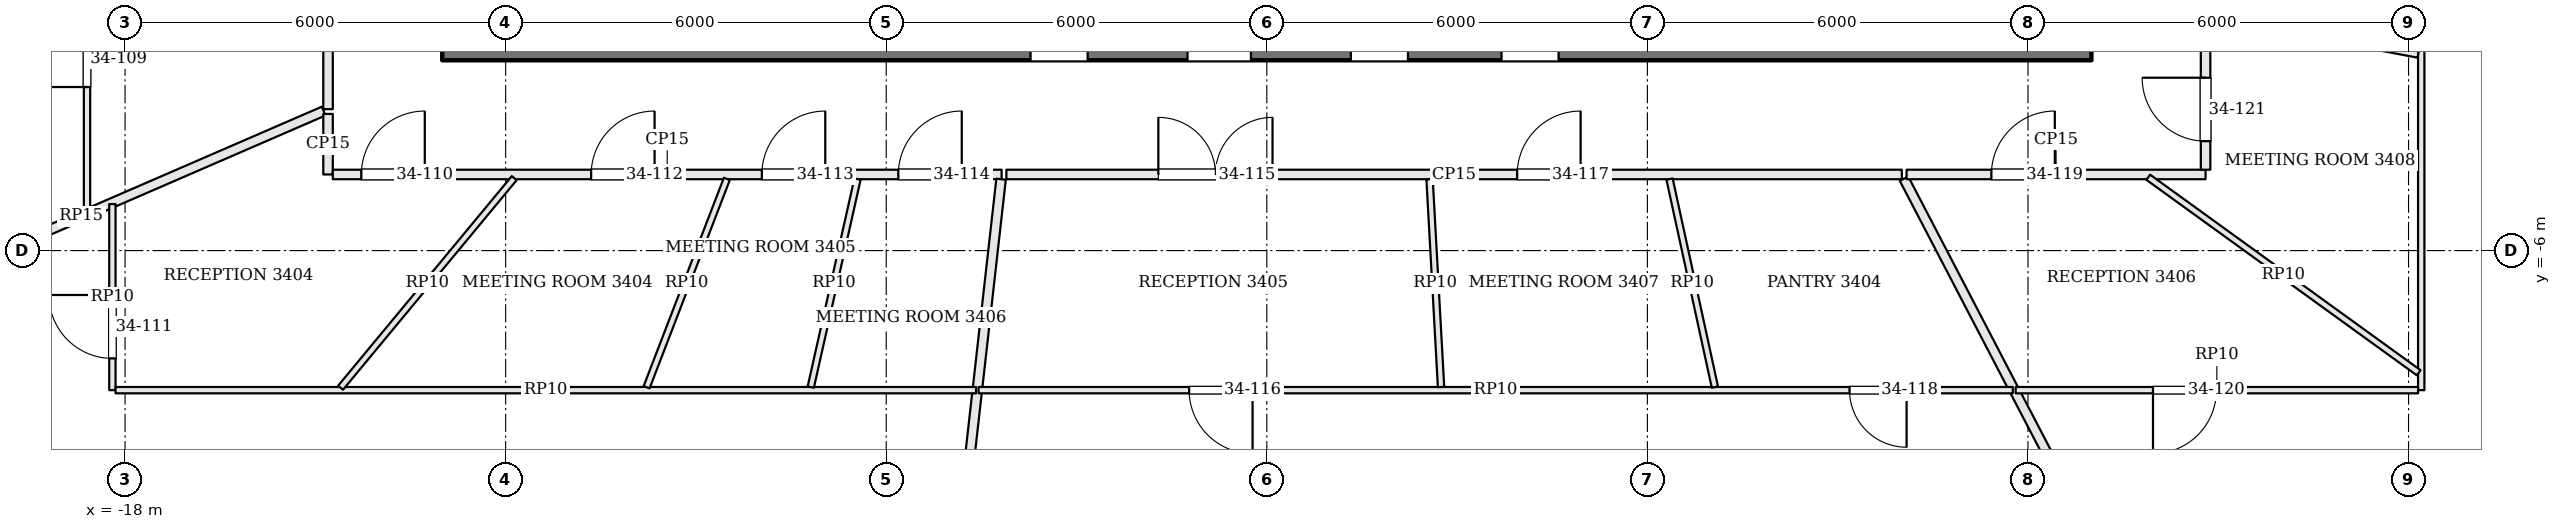
"""IFC4 building model, lengths in metres.
Left out: names, types, materials, properties, quantities, classifications, styles, units other than length and angle.
Written with IfcOpenShell. Run it as: python <this file> out.ifc"""

import sys

from ifc_helpers import new_model, si_unit, direction, frame, frame_2d, origin, place, context, subcontext, project, spatial, rectangle, extrude, element, fill, save


model = new_model("IFC4")
c1 = context("Model", 3, precision=1e-05, world=origin(), true_north=direction((0.0, 1.0)))
c2 = subcontext(c1, "Body", "Model", "MODEL_VIEW")
j1 = project(units=[si_unit("LENGTHUNIT", "METRE"), si_unit("PLANEANGLEUNIT", "RADIAN")], contexts=[c1])
p1 = place(None, origin())
s1 = spatial("IfcSite", under=j1, at=p1, CompositionType="ELEMENT")
p2 = place(p1, origin())
s2 = spatial("IfcBuilding", under=s1, at=p2, CompositionType="ELEMENT")
p3 = place(p2, frame((0.0, 0.0, 142.2)))
s3 = spatial("IfcBuildingStorey", under=s2, at=p3, CompositionType="ELEMENT", Elevation=142.2)
p4 = place(p3, frame((-13.0, -2.45, 0.0), z_axis=(0.0, 0.0, 1.0), x_axis=(1.0, 0.0, 0.0)))
e1 = element("IfcWall", 1, at=p4, inside=s3, PredefinedType="SHEAR", context=c2, shape_type="SweptSolid", body=[
    extrude(rectangle(XDim=26.0, YDim=1.1, at=frame_2d((13.0, 0.0))), origin(), (0.0, 0.0, 1.0), 3.9),
])
p5 = place(p4, frame((9.275, 0.0, 0.0)))
e2 = element("IfcOpeningElement", 2, at=p5, cuts=e1, PredefinedType="OPENING", context=c2, shape_type="SweptSolid", body=[
    extrude(rectangle(XDim=0.9, YDim=2.1, at=frame_2d((0.45, 1.05))), frame((0.0, 0.56, 0.0), z_axis=(0.0, -1.0, 0.0), x_axis=(1.0, 0.0, 0.0)), (0.0, 0.0, 1.0), 1.12),
])
p6 = place(p4, frame((11.75, 0.0, 0.0)))
e3 = element("IfcOpeningElement", 3, at=p6, cuts=e1, PredefinedType="OPENING", context=c2, shape_type="SweptSolid", body=[
    extrude(rectangle(XDim=1.0, YDim=2.1, at=frame_2d((0.5, 1.05))), frame((0.0, 0.56, 0.0), z_axis=(0.0, -1.0, 0.0), x_axis=(1.0, 0.0, 0.0)), (0.0, 0.0, 1.0), 1.12),
])
p7 = place(p4, frame((14.325, 0.0, 0.0)))
e4 = element("IfcOpeningElement", 4, at=p7, cuts=e1, PredefinedType="OPENING", context=c2, shape_type="SweptSolid", body=[
    extrude(rectangle(XDim=0.9, YDim=2.1, at=frame_2d((0.45, 1.05))), frame((0.0, 0.56, 0.0), z_axis=(0.0, -1.0, 0.0), x_axis=(1.0, 0.0, 0.0)), (0.0, 0.0, 1.0), 1.12),
])
p8 = place(p4, frame((16.7, 0.0, 0.0)))
e5 = element("IfcOpeningElement", 5, at=p8, cuts=e1, PredefinedType="OPENING", context=c2, shape_type="SweptSolid", body=[
    extrude(rectangle(XDim=0.9, YDim=2.1, at=frame_2d((0.45, 1.05))), frame((0.0, 0.56, 0.0), z_axis=(0.0, -1.0, 0.0), x_axis=(1.0, 0.0, 0.0)), (0.0, 0.0, 1.0), 1.12),
])
p9 = place(p3, frame((-14.8, 12.882, 0.0), z_axis=(0.0, 0.0, 1.0), x_axis=(0.0, -1.0, 0.0)))
e6 = element("IfcWall", 6, at=p9, inside=s3, PredefinedType="PARTITIONING", context=c2, shape_type="SweptSolid", body=[
    extrude(rectangle(XDim=16.652, YDim=0.15, at=frame_2d((8.326, 0.0))), origin(), (0.0, 0.0, 1.0), 3.198),
])
p10 = place(p9, frame((2.599, 0.0, 0.0)))
e7 = element("IfcOpeningElement", 7, at=p10, cuts=e6, PredefinedType="OPENING", context=c2, shape_type="SweptSolid", body=[
    extrude(rectangle(XDim=1.8, YDim=2.1, at=frame_2d((0.9, 1.05))), frame((0.0, 0.085, 0.0), z_axis=(0.0, -1.0, 0.0), x_axis=(1.0, 0.0, 0.0)), (0.0, 0.0, 1.0), 0.17),
])
p11 = place(p9, frame((9.456, 0.0, 0.0)))
e8 = element("IfcOpeningElement", 8, at=p11, cuts=e6, PredefinedType="OPENING", context=c2, shape_type="SweptSolid", body=[
    extrude(rectangle(XDim=1.0, YDim=2.4, at=frame_2d((0.5, 1.2))), frame((0.0, 0.085, 0.0), z_axis=(0.0, -1.0, 0.0), x_axis=(1.0, 0.0, 0.0)), (0.0, 0.0, 1.0), 0.17),
])
p12 = place(p9, frame((14.15, 0.0, 0.0)))
e9 = element("IfcOpeningElement", 9, at=p12, cuts=e6, PredefinedType="OPENING", context=c2, shape_type="SweptSolid", body=[
    extrude(rectangle(XDim=1.0, YDim=2.1, at=frame_2d((0.5, 1.05))), frame((0.0, 0.085, 0.0), z_axis=(0.0, -1.0, 0.0), x_axis=(1.0, 0.0, 0.0)), (0.0, 0.0, 1.0), 0.17),
])
p13 = place(p3, frame((-22.514, -7.116, 0.0), z_axis=(0.0, 0.0, 1.0), x_axis=(0.917457618692, 0.397833530392, 0.0)))
e10 = element("IfcWall", 10, at=p13, inside=s3, PredefinedType="PARTITIONING", context=c2, shape_type="SweptSolid", body=[
    extrude(rectangle(XDim=8.333, YDim=0.15, at=frame_2d((4.167, 0.0))), origin(), (0.0, 0.0, 1.0), 3.198),
])
p14 = place(p3, frame((-14.8, -3.846, 0.0), z_axis=(0.0, 0.0, 1.0), x_axis=(0.0, -1.0, 0.0)))
e11 = element("IfcWall", 11, at=p14, inside=s3, PredefinedType="PARTITIONING", context=c2, shape_type="SweptSolid", body=[
    extrude(rectangle(XDim=0.954, YDim=0.15, at=frame_2d((0.477, 0.0))), origin(), (0.0, 0.0, 1.0), 3.198),
])
p15 = place(p3, frame((-14.725, -4.8, 0.0), z_axis=(0.0, 0.0, 1.0), x_axis=(1.0, 0.0, 0.0)))
e12 = element("IfcWall", 12, at=p15, inside=s3, PredefinedType="PARTITIONING", context=c2, shape_type="SweptSolid", body=[
    extrude(rectangle(XDim=10.544, YDim=0.15, at=frame_2d((5.272, 0.0))), origin(), (0.0, 0.0, 1.0), 3.198),
])
p16 = place(p15, frame((0.45, 0.0, 0.0)))
e13 = element("IfcOpeningElement", 13, at=p16, cuts=e12, PredefinedType="OPENING", context=c2, shape_type="SweptSolid", body=[
    extrude(rectangle(XDim=1.0, YDim=2.1, at=frame_2d((0.5, 1.05))), frame((0.0, 0.085, 0.0), z_axis=(0.0, -1.0, 0.0), x_axis=(1.0, 0.0, 0.0)), (0.0, 0.0, 1.0), 0.17),
])
p17 = place(p15, frame((4.073, 0.0, 0.0)))
e14 = element("IfcOpeningElement", 14, at=p17, cuts=e12, PredefinedType="OPENING", context=c2, shape_type="SweptSolid", body=[
    extrude(rectangle(XDim=1.0, YDim=2.4, at=frame_2d((0.5, 1.2))), frame((0.0, 0.085, 0.0), z_axis=(0.0, -1.0, 0.0), x_axis=(1.0, 0.0, 0.0)), (0.0, 0.0, 1.0), 0.17),
])
p18 = place(p15, frame((6.764, 0.0, 0.0)))
e15 = element("IfcOpeningElement", 15, at=p18, cuts=e12, PredefinedType="OPENING", context=c2, shape_type="SweptSolid", body=[
    extrude(rectangle(XDim=1.0, YDim=2.4, at=frame_2d((0.5, 1.2))), frame((0.0, 0.085, 0.0), z_axis=(0.0, -1.0, 0.0), x_axis=(1.0, 0.0, 0.0)), (0.0, 0.0, 1.0), 0.17),
])
p19 = place(p15, frame((8.916, 0.0, 0.0)))
e16 = element("IfcOpeningElement", 16, at=p19, cuts=e12, PredefinedType="OPENING", context=c2, shape_type="SweptSolid", body=[
    extrude(rectangle(XDim=1.0, YDim=2.4, at=frame_2d((0.5, 1.2))), frame((0.0, 0.085, 0.0), z_axis=(0.0, -1.0, 0.0), x_axis=(1.0, 0.0, 0.0)), (0.0, 0.0, 1.0), 0.17),
])
p20 = place(p3, frame((-5.59, -17.294, 0.0), z_axis=(0.0, 0.0, 1.0), x_axis=(0.112047950982, 0.993702800983, 0.0)))
e17 = element("IfcWall", 17, at=p20, inside=s3, PredefinedType="PARTITIONING", context=c2, shape_type="SweptSolid", body=[
    extrude(rectangle(XDim=12.498, YDim=0.15, at=frame_2d((6.249, 0.0))), origin(), (0.0, 0.0, 1.0), 3.198),
])
p21 = place(p3, frame((-4.106, -4.8, 0.0), z_axis=(0.0, 0.0, 1.0), x_axis=(1.0, 0.0, 0.0)))
e18 = element("IfcWall", 18, at=p21, inside=s3, PredefinedType="PARTITIONING", context=c2, shape_type="SweptSolid", body=[
    extrude(rectangle(XDim=14.117, YDim=0.15, at=frame_2d((7.059, 0.0))), origin(), (0.0, 0.0, 1.0), 3.198),
])
p22 = place(p21, frame((2.396, 0.0, 0.0)))
e19 = element("IfcOpeningElement", 19, at=p22, cuts=e18, PredefinedType="OPENING", context=c2, shape_type="SweptSolid", body=[
    extrude(rectangle(XDim=1.8, YDim=2.1, at=frame_2d((0.9, 1.05))), frame((0.0, 0.085, 0.0), z_axis=(0.0, -1.0, 0.0), x_axis=(1.0, 0.0, 0.0)), (0.0, 0.0, 1.0), 0.17),
])
p23 = place(p21, frame((8.053, 0.0, 0.0)))
e20 = element("IfcOpeningElement", 20, at=p23, cuts=e18, PredefinedType="OPENING", context=c2, shape_type="SweptSolid", body=[
    extrude(rectangle(XDim=1.0, YDim=2.4, at=frame_2d((0.5, 1.2))), frame((0.0, 0.085, 0.0), z_axis=(0.0, -1.0, 0.0), x_axis=(1.0, 0.0, 0.0)), (0.0, 0.0, 1.0), 0.17),
])
p24 = place(p3, frame((15.244, -14.841, 0.0), z_axis=(0.0, 0.0, 1.0), x_axis=(-0.46213645011, 0.88680883029, 0.0)))
e21 = element("IfcWall", 21, at=p24, inside=s3, PredefinedType="PARTITIONING", context=c2, shape_type="SweptSolid", body=[
    extrude(rectangle(XDim=11.248, YDim=0.15, at=frame_2d((5.624, 0.0))), origin(), (0.0, 0.0, 1.0), 3.198),
])
p25 = place(p3, frame((10.086, -4.8, 0.0), z_axis=(0.0, 0.0, 1.0), x_axis=(1.0, 0.0, 0.0)))
e22 = element("IfcWall", 22, at=p25, inside=s3, PredefinedType="PARTITIONING", context=c2, shape_type="SweptSolid", body=[
    extrude(rectangle(XDim=4.714, YDim=0.15, at=frame_2d((2.357, 0.0))), origin(), (0.0, 0.0, 1.0), 3.198),
])
p26 = place(p25, frame((1.337, 0.0, 0.0)))
e23 = element("IfcOpeningElement", 23, at=p26, cuts=e22, PredefinedType="OPENING", context=c2, shape_type="SweptSolid", body=[
    extrude(rectangle(XDim=1.0, YDim=2.1, at=frame_2d((0.5, 1.05))), frame((0.0, 0.085, 0.0), z_axis=(0.0, -1.0, 0.0), x_axis=(1.0, 0.0, 0.0)), (0.0, 0.0, 1.0), 0.17),
])
p27 = place(p3, frame((14.8, -4.725, 0.0), z_axis=(0.0, 0.0, 1.0), x_axis=(0.0, 1.0, 0.0)))
e24 = element("IfcWall", 24, at=p27, inside=s3, PredefinedType="PARTITIONING", context=c2, shape_type="SweptSolid", body=[
    extrude(rectangle(XDim=8.434, YDim=0.15, at=frame_2d((4.217, 0.0))), origin(), (0.0, 0.0, 1.0), 3.198),
])
p28 = place(p27, frame((0.45, 0.0, 0.0)))
e25 = element("IfcOpeningElement", 25, at=p28, cuts=e24, PredefinedType="OPENING", context=c2, shape_type="SweptSolid", body=[
    extrude(rectangle(XDim=1.0, YDim=2.4, at=frame_2d((0.5, 1.2))), frame((0.0, 0.085, 0.0), z_axis=(0.0, -1.0, 0.0), x_axis=(1.0, 0.0, 0.0)), (0.0, 0.0, 1.0), 0.17),
])
p29 = place(p3, frame((-18.6, -5.397, 0.0), z_axis=(0.0, 0.0, 1.0), x_axis=(0.0, 1.0, 0.0)))
e26 = element("IfcWall", 26, at=p29, inside=s3, PredefinedType="PARTITIONING", context=c2, shape_type="SweptSolid", body=[
    extrude(rectangle(XDim=16.919, YDim=0.1, at=frame_2d((8.459, 0.0))), origin(), (0.0, 0.0, 1.0), 3.184),
])
p30 = place(p29, frame((1.975, 0.0, 0.0)))
e27 = element("IfcOpeningElement", 27, at=p30, cuts=e26, PredefinedType="OPENING", context=c2, shape_type="SweptSolid", body=[
    extrude(rectangle(XDim=0.9, YDim=2.1, at=frame_2d((0.45, 1.05))), frame((0.0, 0.06, 0.0), z_axis=(0.0, -1.0, 0.0), x_axis=(1.0, 0.0, 0.0)), (0.0, 0.0, 1.0), 0.12),
])
p31 = place(p29, frame((7.95, 0.0, 0.0)))
e28 = element("IfcOpeningElement", 28, at=p31, cuts=e26, PredefinedType="OPENING", context=c2, shape_type="SweptSolid", body=[
    extrude(rectangle(XDim=1.0, YDim=2.4, at=frame_2d((0.5, 1.2))), frame((0.0, 0.06, 0.0), z_axis=(0.0, -1.0, 0.0), x_axis=(1.0, 0.0, 0.0)), (0.0, 0.0, 1.0), 0.12),
])
p32 = place(p3, frame((-18.2, -8.2, 0.0), z_axis=(0.0, 0.0, 1.0), x_axis=(0.0, 1.0, 0.0)))
e29 = element("IfcWall", 29, at=p32, inside=s3, PredefinedType="PARTITIONING", context=c2, shape_type="SweptSolid", body=[
    extrude(rectangle(XDim=2.933, YDim=0.1, at=frame_2d((1.467, 0.0))), origin(), (0.0, 0.0, 1.0), 3.184),
])
p33 = place(p32, frame((0.5, 0.0, 0.0)))
e30 = element("IfcOpeningElement", 30, at=p33, cuts=e29, PredefinedType="OPENING", context=c2, shape_type="SweptSolid", body=[
    extrude(rectangle(XDim=1.0, YDim=2.1, at=frame_2d((0.5, 1.05))), frame((0.0, 0.06, 0.0), z_axis=(0.0, -1.0, 0.0), x_axis=(1.0, 0.0, 0.0)), (0.0, 0.0, 1.0), 0.12),
])
p34 = place(p3, frame((-4.584, -8.2, 0.0), z_axis=(0.0, 0.0, 1.0), x_axis=(-1.0, 0.0, 0.0)))
e31 = element("IfcWall", 31, at=p34, inside=s3, PredefinedType="PARTITIONING", context=c2, shape_type="SweptSolid", body=[
    extrude(rectangle(XDim=13.566, YDim=0.1, at=frame_2d((6.783, 0.0))), origin(), (0.0, 0.0, 1.0), 3.184),
])
p35 = place(p3, frame((-11.865, -4.858, 0.0), z_axis=(0.0, 0.0, 1.0), x_axis=(-0.638010152626, -0.770027950886, 0.0)))
e32 = element("IfcWall", 32, at=p35, inside=s3, PredefinedType="PARTITIONING", context=c2, shape_type="SweptSolid", body=[
    extrude(rectangle(XDim=4.29, YDim=0.1, at=frame_2d((2.145, 0.0))), origin(), (0.0, 0.0, 1.0), 3.184),
])
p36 = place(p3, frame((-8.513, -4.87, 0.0), z_axis=(0.0, 0.0, 1.0), x_axis=(-0.359444024243, -0.933166648266, 0.0)))
e33 = element("IfcWall", 33, at=p36, inside=s3, PredefinedType="PARTITIONING", context=c2, shape_type="SweptSolid", body=[
    extrude(rectangle(XDim=3.518, YDim=0.1, at=frame_2d((1.759, 0.0))), origin(), (0.0, 0.0, 1.0), 3.184),
])
p37 = place(p3, frame((-6.453, -4.873, 0.0), z_axis=(0.0, 0.0, 1.0), x_axis=(-0.21917670953, -0.975685179758, 0.0)))
e34 = element("IfcWall", 34, at=p37, inside=s3, PredefinedType="PARTITIONING", context=c2, shape_type="SweptSolid", body=[
    extrude(rectangle(XDim=3.36, YDim=0.1, at=frame_2d((1.68, 0.0))), origin(), (0.0, 0.0, 1.0), 3.184),
])
p38 = place(p3, frame((11.76, -8.2, 0.0), z_axis=(0.0, 0.0, 1.0), x_axis=(-1.0, 0.0, 0.0)))
e35 = element("IfcWall", 35, at=p38, inside=s3, PredefinedType="PARTITIONING", context=c2, shape_type="SweptSolid", body=[
    extrude(rectangle(XDim=16.305, YDim=0.1, at=frame_2d((8.152, 0.0))), origin(), (0.0, 0.0, 1.0), 3.184),
])
p39 = place(p38, frame((11.985, 0.0, 0.0)))
e36 = element("IfcOpeningElement", 36, at=p39, cuts=e35, PredefinedType="OPENING", context=c2, shape_type="SweptSolid", body=[
    extrude(rectangle(XDim=1.0, YDim=2.1, at=frame_2d((0.5, 1.05))), frame((0.0, 0.06, 0.0), z_axis=(0.0, -1.0, 0.0), x_axis=(1.0, 0.0, 0.0)), (0.0, 0.0, 1.0), 0.12),
])
p40 = place(p38, frame((1.674, 0.0, 0.0)))
e37 = element("IfcOpeningElement", 37, at=p40, cuts=e35, PredefinedType="OPENING", context=c2, shape_type="SweptSolid", body=[
    extrude(rectangle(XDim=0.9, YDim=2.1, at=frame_2d((0.45, 1.05))), frame((0.0, 0.06, 0.0), z_axis=(0.0, -1.0, 0.0), x_axis=(1.0, 0.0, 0.0)), (0.0, 0.0, 1.0), 0.12),
])
p41 = place(p3, frame((2.566, -4.875, 0.0), z_axis=(0.0, 0.0, 1.0), x_axis=(0.05515260166, -0.998477936927, 0.0)))
e38 = element("IfcWall", 38, at=p41, inside=s3, PredefinedType="PARTITIONING", context=c2, shape_type="SweptSolid", body=[
    extrude(rectangle(XDim=3.28, YDim=0.1, at=frame_2d((1.64, 0.0))), origin(), (0.0, 0.0, 1.0), 3.184),
])
p42 = place(p3, frame((6.35, -4.873, 0.0), z_axis=(0.0, 0.0, 1.0), x_axis=(0.213006668545, -0.977050745435, 0.0)))
e39 = element("IfcWall", 39, at=p42, inside=s3, PredefinedType="PARTITIONING", context=c2, shape_type="SweptSolid", body=[
    extrude(rectangle(XDim=3.355, YDim=0.1, at=frame_2d((1.677, 0.0))), origin(), (0.0, 0.0, 1.0), 3.184),
])
p43 = place(p3, frame((18.2, 5.199, 0.0), z_axis=(0.0, 0.0, 1.0), x_axis=(0.0, -1.0, 0.0)))
e40 = element("IfcWall", 40, at=p43, inside=s3, PredefinedType="PARTITIONING", context=c2, shape_type="SweptSolid", body=[
    extrude(rectangle(XDim=13.399, YDim=0.1, at=frame_2d((6.7, 0.0))), origin(), (0.0, 0.0, 1.0), 3.184),
])
p44 = place(p43, frame((6.227, 0.0, 0.0)))
e41 = element("IfcOpeningElement", 41, at=p44, cuts=e40, PredefinedType="OPENING", context=c2, shape_type="SweptSolid", body=[
    extrude(rectangle(XDim=0.9, YDim=2.1, at=frame_2d((0.45, 1.05))), frame((0.0, 0.06, 0.0), z_axis=(0.0, -1.0, 0.0), x_axis=(1.0, 0.0, 0.0)), (0.0, 0.0, 1.0), 0.12),
])
p45 = place(p43, frame((2.007, 0.0, 0.0)))
e42 = element("IfcOpeningElement", 42, at=p45, cuts=e40, PredefinedType="OPENING", context=c2, shape_type="SweptSolid", body=[
    extrude(rectangle(XDim=0.9, YDim=2.1, at=frame_2d((0.45, 1.05))), frame((0.0, 0.06, 0.0), z_axis=(0.0, -1.0, 0.0), x_axis=(1.0, 0.0, 0.0)), (0.0, 0.0, 1.0), 0.12),
])
p46 = place(p3, frame((18.15, -8.2, 0.0), z_axis=(0.0, 0.0, 1.0), x_axis=(-1.0, 0.0, 0.0)))
e43 = element("IfcWall", 43, at=p46, inside=s3, PredefinedType="PARTITIONING", context=c2, shape_type="SweptSolid", body=[
    extrude(rectangle(XDim=6.344, YDim=0.1, at=frame_2d((3.172, 0.0))), origin(), (0.0, 0.0, 1.0), 3.184),
])
p47 = place(p46, frame((3.179, 0.0, 0.0)))
e44 = element("IfcOpeningElement", 44, at=p47, cuts=e43, PredefinedType="OPENING", context=c2, shape_type="SweptSolid", body=[
    extrude(rectangle(XDim=1.0, YDim=2.1, at=frame_2d((0.5, 1.05))), frame((0.0, 0.06, 0.0), z_axis=(0.0, -1.0, 0.0), x_axis=(1.0, 0.0, 0.0)), (0.0, 0.0, 1.0), 0.12),
])
p48 = place(p3, frame((13.896, -4.844, 0.0), z_axis=(0.0, 0.0, 1.0), x_axis=(0.810468668719, -0.585781987624, 0.0)))
e45 = element("IfcWall", 45, at=p48, inside=s3, PredefinedType="PARTITIONING", context=c2, shape_type="SweptSolid", body=[
    extrude(rectangle(XDim=5.26, YDim=0.1, at=frame_2d((2.63, 0.0))), origin(), (0.0, 0.0, 1.0), 3.184),
])
p49 = place(p3, frame((14.874, -2.29, 0.0), z_axis=(0.0, 0.0, 1.0), x_axis=(0.982563379302, -0.185927958238, 0.0)))
e46 = element("IfcWall", 46, at=p49, inside=s3, PredefinedType="PARTITIONING", context=c2, shape_type="SweptSolid", body=[
    extrude(rectangle(XDim=3.335, YDim=0.1, at=frame_2d((1.667, 0.0))), origin(), (0.0, 0.0, 1.0), 3.184),
])
p50 = place(p30, origin())
e47 = element("IfcDoor", 47, at=p50, inside=s3, OperationType="SINGLE_SWING_LEFT", PredefinedType="DOOR", context=c2, shape_type="SweptSolid", body=[
    extrude(rectangle(XDim=0.9, YDim=2.1, at=frame_2d((0.45, 1.05))), frame((0.0, 0.025, 0.0), z_axis=(0.0, -1.0, 0.0), x_axis=(1.0, 0.0, 0.0)), (0.0, 0.0, 1.0), 0.05),
])
fill(e27, e47)
p51 = place(p16, origin())
e48 = element("IfcDoor", 48, at=p51, inside=s3, OperationType="SINGLE_SWING_RIGHT", PredefinedType="DOOR", context=c2, shape_type="SweptSolid", body=[
    extrude(rectangle(XDim=1.0, YDim=2.1, at=frame_2d((0.5, 1.05))), frame((0.0, 0.025, 0.0), z_axis=(0.0, -1.0, 0.0), x_axis=(1.0, 0.0, 0.0)), (0.0, 0.0, 1.0), 0.05),
])
fill(e13, e48)
p52 = place(p33, origin())
e49 = element("IfcDoor", 49, at=p52, inside=s3, OperationType="SINGLE_SWING_RIGHT", PredefinedType="DOOR", context=c2, shape_type="SweptSolid", body=[
    extrude(rectangle(XDim=1.0, YDim=2.1, at=frame_2d((0.5, 1.05))), frame((0.0, 0.025, 0.0), z_axis=(0.0, -1.0, 0.0), x_axis=(1.0, 0.0, 0.0)), (0.0, 0.0, 1.0), 0.05),
])
fill(e30, e49)
p53 = place(p17, origin())
e50 = element("IfcDoor", 50, at=p53, inside=s3, OperationType="SINGLE_SWING_RIGHT", PredefinedType="DOOR", context=c2, shape_type="SweptSolid", body=[
    extrude(rectangle(XDim=1.0, YDim=2.4, at=frame_2d((0.5, 1.2))), frame((0.0, 0.025, 0.0), z_axis=(0.0, -1.0, 0.0), x_axis=(1.0, 0.0, 0.0)), (0.0, 0.0, 1.0), 0.05),
])
fill(e14, e50)
p54 = place(p18, origin())
e51 = element("IfcDoor", 51, at=p54, inside=s3, OperationType="SINGLE_SWING_RIGHT", PredefinedType="DOOR", context=c2, shape_type="SweptSolid", body=[
    extrude(rectangle(XDim=1.0, YDim=2.4, at=frame_2d((0.5, 1.2))), frame((0.0, 0.025, 0.0), z_axis=(0.0, -1.0, 0.0), x_axis=(1.0, 0.0, 0.0)), (0.0, 0.0, 1.0), 0.05),
])
fill(e15, e51)
p55 = place(p19, origin())
e52 = element("IfcDoor", 52, at=p55, inside=s3, OperationType="SINGLE_SWING_RIGHT", PredefinedType="DOOR", context=c2, shape_type="SweptSolid", body=[
    extrude(rectangle(XDim=1.0, YDim=2.4, at=frame_2d((0.5, 1.2))), frame((0.0, 0.025, 0.0), z_axis=(0.0, -1.0, 0.0), x_axis=(1.0, 0.0, 0.0)), (0.0, 0.0, 1.0), 0.05),
])
fill(e16, e52)
p56 = place(p22, origin())
e53 = element("IfcDoor", 53, at=p56, inside=s3, OperationType="DOUBLE_DOOR_SINGLE_SWING", PredefinedType="DOOR", context=c2, shape_type="SweptSolid", body=[
    extrude(rectangle(XDim=1.8, YDim=2.1, at=frame_2d((0.9, 1.05))), frame((0.0, 0.025, 0.0), z_axis=(0.0, -1.0, 0.0), x_axis=(1.0, 0.0, 0.0)), (0.0, 0.0, 1.0), 0.05),
])
fill(e19, e53)
p57 = place(p39, origin())
e54 = element("IfcDoor", 54, at=p57, inside=s3, OperationType="SINGLE_SWING_LEFT", PredefinedType="DOOR", context=c2, shape_type="SweptSolid", body=[
    extrude(rectangle(XDim=1.0, YDim=2.1, at=frame_2d((0.5, 1.05))), frame((0.0, 0.025, 0.0), z_axis=(0.0, -1.0, 0.0), x_axis=(1.0, 0.0, 0.0)), (0.0, 0.0, 1.0), 0.05),
])
fill(e36, e54)
p58 = place(p23, origin())
e55 = element("IfcDoor", 55, at=p58, inside=s3, OperationType="SINGLE_SWING_RIGHT", PredefinedType="DOOR", context=c2, shape_type="SweptSolid", body=[
    extrude(rectangle(XDim=1.0, YDim=2.4, at=frame_2d((0.5, 1.2))), frame((0.0, 0.025, 0.0), z_axis=(0.0, -1.0, 0.0), x_axis=(1.0, 0.0, 0.0)), (0.0, 0.0, 1.0), 0.05),
])
fill(e20, e55)
p59 = place(p40, origin())
e56 = element("IfcDoor", 56, at=p59, inside=s3, OperationType="SINGLE_SWING_LEFT", PredefinedType="DOOR", context=c2, shape_type="SweptSolid", body=[
    extrude(rectangle(XDim=0.9, YDim=2.1, at=frame_2d((0.45, 1.05))), frame((0.0, 0.025, 0.0), z_axis=(0.0, -1.0, 0.0), x_axis=(1.0, 0.0, 0.0)), (0.0, 0.0, 1.0), 0.05),
])
fill(e37, e56)
p60 = place(p26, origin())
e57 = element("IfcDoor", 57, at=p60, inside=s3, OperationType="SINGLE_SWING_RIGHT", PredefinedType="DOOR", context=c2, shape_type="SweptSolid", body=[
    extrude(rectangle(XDim=1.0, YDim=2.1, at=frame_2d((0.5, 1.05))), frame((0.0, 0.025, 0.0), z_axis=(0.0, -1.0, 0.0), x_axis=(1.0, 0.0, 0.0)), (0.0, 0.0, 1.0), 0.05),
])
fill(e23, e57)
p61 = place(p47, origin())
e58 = element("IfcDoor", 58, at=p61, inside=s3, OperationType="SINGLE_SWING_RIGHT", PredefinedType="DOOR", context=c2, shape_type="SweptSolid", body=[
    extrude(rectangle(XDim=1.0, YDim=2.1, at=frame_2d((0.5, 1.05))), frame((0.0, 0.025, 0.0), z_axis=(0.0, -1.0, 0.0), x_axis=(1.0, 0.0, 0.0)), (0.0, 0.0, 1.0), 0.05),
])
fill(e44, e58)
p62 = place(p28, origin())
e59 = element("IfcDoor", 59, at=p62, inside=s3, OperationType="SINGLE_SWING_RIGHT", PredefinedType="DOOR", context=c2, shape_type="SweptSolid", body=[
    extrude(rectangle(XDim=1.0, YDim=2.4, at=frame_2d((0.5, 1.2))), frame((0.0, 0.025, 0.0), z_axis=(0.0, -1.0, 0.0), x_axis=(1.0, 0.0, 0.0)), (0.0, 0.0, 1.0), 0.05),
])
fill(e25, e59)
save(model, sys.argv[1])
